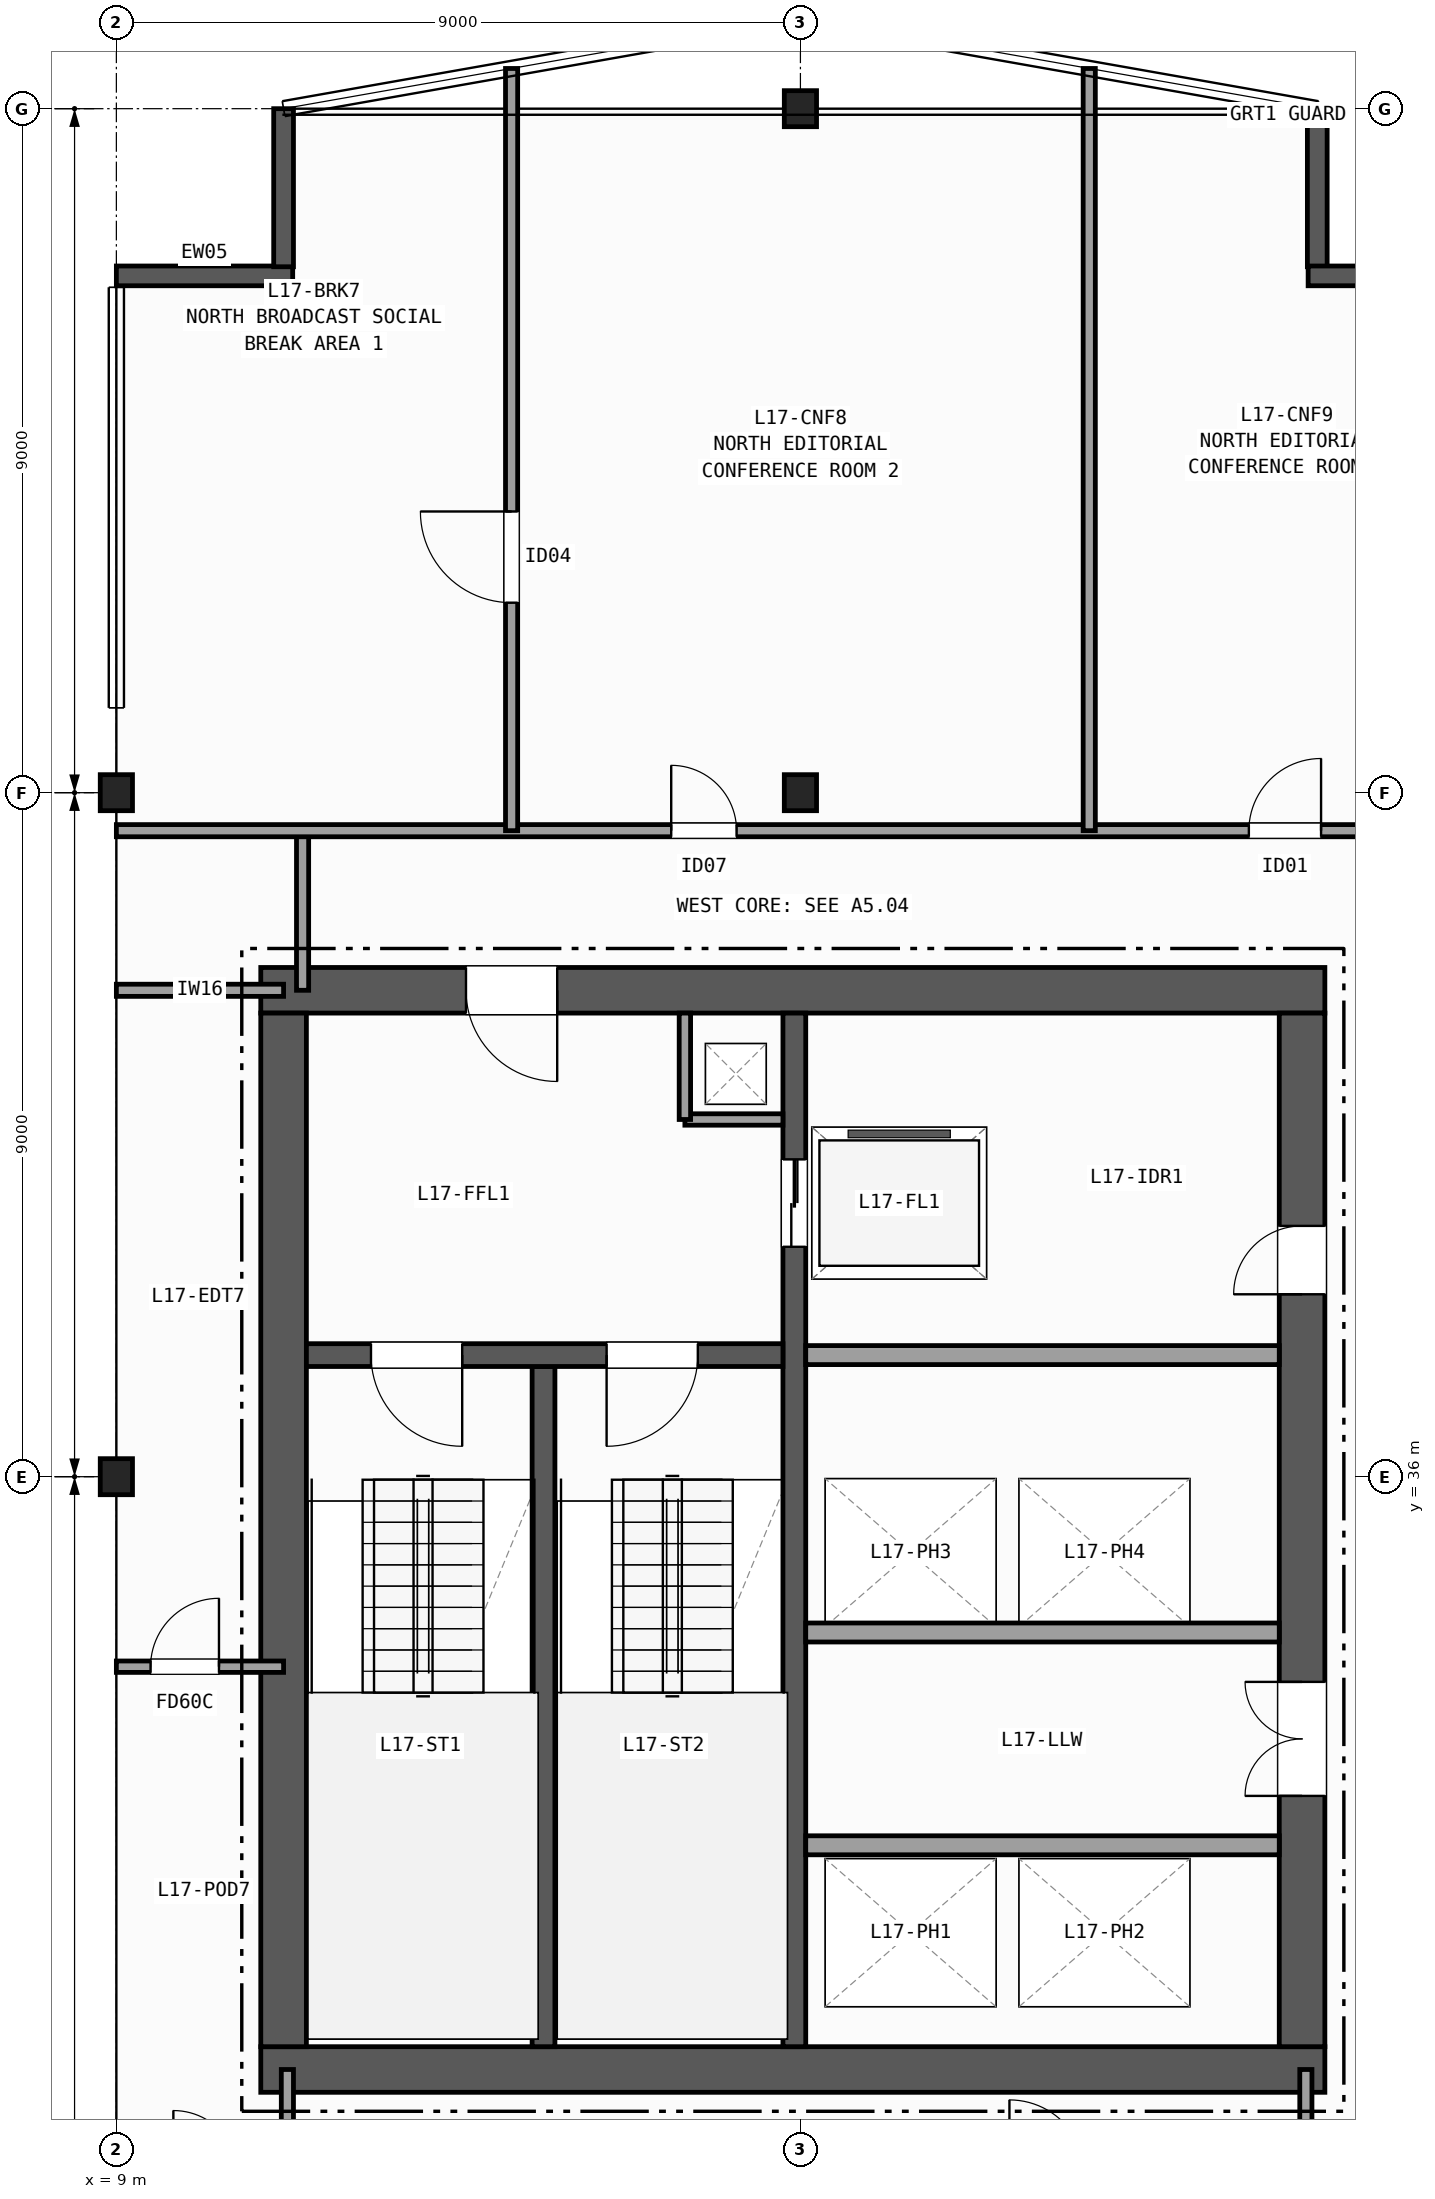
"""IFC4 building model, lengths in metres.
Left out: names, types, materials, properties, quantities, classifications, styles, units other than length and angle.
Written with IfcOpenShell. Run it as: python <this file> out.ifc"""

import sys

from ifc_helpers import new_model, si_unit, direction, frame, frame_2d, origin, origin_2d, place, context, subcontext, project, spatial, rectangle, i_section, extrude, element, fill, save


model = new_model("IFC4")
c1 = context("Model", 3, precision=1e-05, world=origin(), true_north=direction((0.0, 1.0)))
c2 = subcontext(c1, "Body", "Model", "MODEL_VIEW")
j1 = project(units=[si_unit("LENGTHUNIT", "METRE"), si_unit("PLANEANGLEUNIT", "RADIAN")], contexts=[c1])
p1 = place(None, origin())
s1 = spatial("IfcSite", under=j1, at=p1, CompositionType="ELEMENT")
p2 = place(p1, origin())
s2 = spatial("IfcBuilding", under=s1, at=p2, CompositionType="ELEMENT")
p3 = place(p2, frame((0.0, 0.0, 73.0)))
s3 = spatial("IfcBuildingStorey", under=s2, at=p3, CompositionType="ELEMENT", Elevation=73.0)
for number, where, z_axis, x_axis in (
    (1, (9.0, 36.0, 0.0), (0.0, 0.0, 1.0), (1.0, 0.0, 0.0)),
    (2, (9.0, 45.0, 0.0), (0.0, 0.0, 1.0), (1.0, 0.0, 0.0)),
    (3, (18.0, 45.0, 0.0), (0.0, 0.0, 1.0), (1.0, 0.0, 0.0)),
    (4, (18.0, 54.0, 0.0), (0.0, 0.0, 1.0), (1.0, 0.0, 0.0)),
):
    element("IfcColumn", number, at=place(p3, frame(where, z_axis=z_axis, x_axis=x_axis)), inside=s3, PredefinedType="COLUMN", context=c2, shape_type="SweptSolid", body=[
        extrude(i_section(OverallWidth=0.424, OverallDepth=0.474, WebThickness=0.048, FlangeThickness=0.077, FilletRadius=0.015, at=origin_2d()), origin(), (0.0, 0.0, 1.0), 3.7),
    ])
p4 = place(p3, frame((9.0, 51.8, 0.0), z_axis=(0.0, 0.0, 1.0), x_axis=(1.0, 0.0, 0.0)))
e5 = element("IfcWall", 5, at=p4, inside=s3, PredefinedType="SOLIDWALL", context=c2, shape_type="SweptSolid", body=[
    extrude(rectangle(XDim=2.32, YDim=0.26, at=frame_2d((1.16, 0.0))), origin(), (0.0, 0.0, 1.0), 3.42),
])
for number, where, z_axis, x_axis in (
    (6, (11.2, 51.92, 0.0), (0.0, 0.0, 1.0), (0.0, 1.0, 0.0)),
    (7, (24.8, 54.0, 0.0), (0.0, 0.0, 1.0), (0.0, -1.0, 0.0)),
):
    element("IfcWall", number, at=place(p3, frame(where, z_axis=z_axis, x_axis=x_axis)), inside=s3, PredefinedType="SOLIDWALL", context=c2, shape_type="SweptSolid", body=[
        extrude(rectangle(XDim=2.08, YDim=0.26, at=frame_2d((1.04, 0.0))), origin(), (0.0, 0.0, 1.0), 3.42),
    ])
p5 = place(p3, frame((24.68, 51.8, 0.0), z_axis=(0.0, 0.0, 1.0), x_axis=(1.0, 0.0, 0.0)))
e8 = element("IfcWall", 8, at=p5, inside=s3, PredefinedType="SOLIDWALL", context=c2, shape_type="SweptSolid", body=[
    extrude(rectangle(XDim=2.32, YDim=0.26, at=frame_2d((1.16, 0.0))), origin(), (0.0, 0.0, 1.0), 3.42),
])
p6 = place(p3, frame((10.9, 28.2, 0.0), z_axis=(0.0, 0.0, 1.0), x_axis=(1.0, 0.0, 0.0)))
e9 = element("IfcWall", 9, at=p6, inside=s3, PredefinedType="SHEAR", context=c2, shape_type="SweptSolid", body=[
    extrude(rectangle(XDim=14.0, YDim=0.6, at=frame_2d((7.0, 0.0))), origin(), (0.0, 0.0, 1.0), 3.42),
])
p7 = place(p3, frame((24.9, 42.4, 0.0), z_axis=(0.0, 0.0, 1.0), x_axis=(-1.0, 0.0, 0.0)))
e10 = element("IfcWall", 10, at=p7, inside=s3, PredefinedType="SHEAR", context=c2, shape_type="SweptSolid", body=[
    extrude(rectangle(XDim=14.0, YDim=0.6, at=frame_2d((7.0, 0.0))), origin(), (0.0, 0.0, 1.0), 3.42),
])
p8 = place(p7, frame((10.1, 0.0, 0.0)))
e11 = element("IfcOpeningElement", 11, at=p8, cuts=e10, PredefinedType="OPENING", context=c2, shape_type="SweptSolid", body=[
    extrude(rectangle(XDim=1.2, YDim=2.15, at=frame_2d((0.6, 1.075))), frame((0.0, 0.31, 0.0), z_axis=(0.0, -1.0, 0.0), x_axis=(1.0, 0.0, 0.0)), (0.0, 0.0, 1.0), 0.62),
])
p9 = place(p3, frame((11.2, 42.1, 0.0), z_axis=(0.0, 0.0, 1.0), x_axis=(0.0, -1.0, 0.0)))
e12 = element("IfcWall", 12, at=p9, inside=s3, PredefinedType="SHEAR", context=c2, shape_type="SweptSolid", body=[
    extrude(rectangle(XDim=13.6, YDim=0.6, at=frame_2d((6.8, 0.0))), origin(), (0.0, 0.0, 1.0), 3.42),
])
p10 = place(p3, frame((24.6, 28.5, 0.0), z_axis=(0.0, 0.0, 1.0), x_axis=(0.0, 1.0, 0.0)))
e13 = element("IfcWall", 13, at=p10, inside=s3, PredefinedType="SHEAR", context=c2, shape_type="SweptSolid", body=[
    extrude(rectangle(XDim=13.6, YDim=0.6, at=frame_2d((6.8, 0.0))), origin(), (0.0, 0.0, 1.0), 3.42),
])
p11 = place(p10, frame((3.3, 0.0, 0.0)))
e14 = element("IfcOpeningElement", 14, at=p11, cuts=e13, PredefinedType="OPENING", context=c2, shape_type="SweptSolid", body=[
    extrude(rectangle(XDim=1.5, YDim=2.2, at=frame_2d((0.75, 1.1))), frame((0.0, 0.31, 0.0), z_axis=(0.0, -1.0, 0.0), x_axis=(1.0, 0.0, 0.0)), (0.0, 0.0, 1.0), 0.62),
])
p12 = place(p10, frame((9.9, 0.0, 0.0)))
e15 = element("IfcOpeningElement", 15, at=p12, cuts=e13, PredefinedType="OPENING", context=c2, shape_type="SweptSolid", body=[
    extrude(rectangle(XDim=0.9, YDim=2.1, at=frame_2d((0.45, 1.05))), frame((0.0, 0.31, 0.0), z_axis=(0.0, -1.0, 0.0), x_axis=(1.0, 0.0, 0.0)), (0.0, 0.0, 1.0), 0.62),
])
p13 = place(p3, frame((14.62, 28.5, 0.0), z_axis=(0.0, 0.0, 1.0), x_axis=(0.0, 1.0, 0.0)))
e16 = element("IfcWall", 16, at=p13, inside=s3, PredefinedType="SHEAR", context=c2, shape_type="SweptSolid", body=[
    extrude(rectangle(XDim=8.95, YDim=0.3, at=frame_2d((4.475, 0.0))), origin(), (0.0, 0.0, 1.0), 3.42),
])
p14 = place(p3, frame((17.92, 42.1, 0.0), z_axis=(0.0, 0.0, 1.0), x_axis=(0.0, -1.0, 0.0)))
e17 = element("IfcWall", 17, at=p14, inside=s3, PredefinedType="SHEAR", context=c2, shape_type="SweptSolid", body=[
    extrude(rectangle(XDim=13.6, YDim=0.3, at=frame_2d((6.8, 0.0))), origin(), (0.0, 0.0, 1.0), 3.42),
])
p15 = place(p14, frame((1.925, 0.0, 0.0)))
e18 = element("IfcOpeningElement", 18, at=p15, cuts=e17, PredefinedType="OPENING", context=c2, shape_type="SweptSolid", body=[
    extrude(rectangle(XDim=1.15, YDim=2.15, at=frame_2d((0.575, 1.075))), frame((0.0, 0.16, 0.0), z_axis=(0.0, -1.0, 0.0), x_axis=(1.0, 0.0, 0.0)), (0.0, 0.0, 1.0), 0.32),
])
p16 = place(p3, frame((17.77, 37.6, 0.0), z_axis=(0.0, 0.0, 1.0), x_axis=(-1.0, 0.0, 0.0)))
e19 = element("IfcWall", 19, at=p16, inside=s3, PredefinedType="SHEAR", context=c2, shape_type="SweptSolid", body=[
    extrude(rectangle(XDim=6.27, YDim=0.3, at=frame_2d((3.135, 0.0))), origin(), (0.0, 0.0, 1.0), 3.42),
])
p17 = place(p16, frame((4.22, 0.0, 0.0)))
e20 = element("IfcOpeningElement", 20, at=p17, cuts=e19, PredefinedType="OPENING", context=c2, shape_type="SweptSolid", body=[
    extrude(rectangle(XDim=1.2, YDim=2.15, at=frame_2d((0.6, 1.075))), frame((0.0, 0.16, 0.0), z_axis=(0.0, -1.0, 0.0), x_axis=(1.0, 0.0, 0.0)), (0.0, 0.0, 1.0), 0.32),
])
p18 = place(p16, frame((1.12, 0.0, 0.0)))
e21 = element("IfcOpeningElement", 21, at=p18, cuts=e19, PredefinedType="OPENING", context=c2, shape_type="SweptSolid", body=[
    extrude(rectangle(XDim=1.2, YDim=2.15, at=frame_2d((0.6, 1.075))), frame((0.0, 0.16, 0.0), z_axis=(0.0, -1.0, 0.0), x_axis=(1.0, 0.0, 0.0)), (0.0, 0.0, 1.0), 0.32),
])
p19 = place(p3, frame((16.48, 40.7, 0.0), z_axis=(0.0, 0.0, 1.0), x_axis=(1.0, 0.0, 0.0)))
e22 = element("IfcWall", 22, at=p19, inside=s3, PredefinedType="PARTITIONING", context=c2, shape_type="SweptSolid", body=[
    extrude(rectangle(XDim=1.29, YDim=0.15, at=frame_2d((0.645, 0.0))), origin(), (0.0, 0.0, 1.0), 3.42),
])
p20 = place(p3, frame((16.48, 40.7, 0.0), z_axis=(0.0, 0.0, 1.0), x_axis=(0.0, 1.0, 0.0)))
e23 = element("IfcWall", 23, at=p20, inside=s3, PredefinedType="PARTITIONING", context=c2, shape_type="SweptSolid", body=[
    extrude(rectangle(XDim=1.4, YDim=0.15, at=frame_2d((0.7, 0.0))), origin(), (0.0, 0.0, 1.0), 3.42),
])
for number, where, z_axis, x_axis in (
    (24, (18.07, 37.6, 0.0), (0.0, 0.0, 1.0), (1.0, 0.0, 0.0)),
    (25, (18.07, 31.15, 0.0), (0.0, 0.0, 1.0), (1.0, 0.0, 0.0)),
    (26, (24.3, 33.95, 0.0), (0.0, 0.0, 1.0), (-1.0, 0.0, 0.0)),
):
    element("IfcWall", number, at=place(p3, frame(where, z_axis=z_axis, x_axis=x_axis)), inside=s3, PredefinedType="PARTITIONING", context=c2, shape_type="SweptSolid", body=[
        extrude(rectangle(XDim=6.23, YDim=0.25, at=frame_2d((3.115, 0.0))), origin(), (0.0, 0.0, 1.0), 3.42),
    ])
p21 = place(p3, frame((9.0, 42.4, 0.0), z_axis=(0.0, 0.0, 1.0), x_axis=(1.0, 0.0, 0.0)))
e27 = element("IfcWall", 27, at=p21, inside=s3, PredefinedType="PARTITIONING", context=c2, shape_type="SweptSolid", body=[
    extrude(rectangle(XDim=2.2, YDim=0.16, at=frame_2d((1.1, 0.0))), origin(), (0.0, 0.0, 1.0), 2.627),
])
p22 = place(p3, frame((11.45, 42.4, 0.0), z_axis=(0.0, 0.0, 1.0), x_axis=(0.0, 1.0, 0.0)))
e28 = element("IfcWall", 28, at=p22, inside=s3, PredefinedType="PARTITIONING", context=c2, shape_type="SweptSolid", body=[
    extrude(rectangle(XDim=2.1, YDim=0.16, at=frame_2d((1.05, 0.0))), origin(), (0.0, 0.0, 1.0), 3.42),
])
p23 = place(p3, frame((9.0, 33.5, 0.0), z_axis=(0.0, 0.0, 1.0), x_axis=(1.0, 0.0, 0.0)))
e29 = element("IfcWall", 29, at=p23, inside=s3, PredefinedType="PARTITIONING", context=c2, shape_type="SweptSolid", body=[
    extrude(rectangle(XDim=2.2, YDim=0.15, at=frame_2d((1.1, 0.0))), origin(), (0.0, 0.0, 1.0), 2.627),
])
p24 = place(p23, frame((0.45, 0.0, 0.0)))
e30 = element("IfcOpeningElement", 30, at=p24, cuts=e29, PredefinedType="OPENING", context=c2, shape_type="SweptSolid", body=[
    extrude(rectangle(XDim=0.9, YDim=2.1, at=frame_2d((0.45, 1.05))), frame((0.0, 0.085, 0.0), z_axis=(0.0, -1.0, 0.0), x_axis=(1.0, 0.0, 0.0)), (0.0, 0.0, 1.0), 0.17),
])
p25 = place(p3, frame((24.65, 9.0, 0.0), z_axis=(0.0, 0.0, 1.0), x_axis=(0.0, 1.0, 0.0)))
e31 = element("IfcWall", 31, at=p25, inside=s3, PredefinedType="PARTITIONING", context=c2, shape_type="SweptSolid", body=[
    extrude(rectangle(XDim=19.2, YDim=0.16, at=frame_2d((9.6, 0.0))), origin(), (0.0, 0.0, 1.0), 2.627),
])
p26 = place(p25, frame((12.2, 0.0, 0.0)))
e32 = element("IfcOpeningElement", 32, at=p26, cuts=e31, PredefinedType="OPENING", context=c2, shape_type="SweptSolid", body=[
    extrude(rectangle(XDim=1.05, YDim=2.15, at=frame_2d((0.525, 1.075))), frame((0.0, 0.09, 0.0), z_axis=(0.0, -1.0, 0.0), x_axis=(1.0, 0.0, 0.0)), (0.0, 0.0, 1.0), 0.18),
])
p27 = place(p25, frame((4.2, 0.0, 0.0)))
e33 = element("IfcOpeningElement", 33, at=p27, cuts=e31, PredefinedType="OPENING", context=c2, shape_type="SweptSolid", body=[
    extrude(rectangle(XDim=1.2, YDim=2.15, at=frame_2d((0.6, 1.075))), frame((0.0, 0.09, 0.0), z_axis=(0.0, -1.0, 0.0), x_axis=(1.0, 0.0, 0.0)), (0.0, 0.0, 1.0), 0.18),
])
p28 = place(p3, frame((11.25, 26.8, 0.0), z_axis=(0.0, 0.0, 1.0), x_axis=(0.0, 1.0, 0.0)))
e34 = element("IfcWall", 34, at=p28, inside=s3, PredefinedType="PARTITIONING", context=c2, shape_type="SweptSolid", body=[
    extrude(rectangle(XDim=1.4, YDim=0.16, at=frame_2d((0.7, 0.0))), origin(), (0.0, 0.0, 1.0), 2.789),
])
p29 = place(p3, frame((9.0, 44.5, 0.0), z_axis=(0.0, 0.0, 1.0), x_axis=(1.0, 0.0, 0.0)))
e35 = element("IfcWall", 35, at=p29, inside=s3, PredefinedType="PARTITIONING", context=c2, shape_type="SweptSolid", body=[
    extrude(rectangle(XDim=18.0, YDim=0.16, at=frame_2d((9.0, 0.0))), origin(), (0.0, 0.0, 1.0), 2.627),
])
p30 = place(p29, frame((7.3, 0.0, 0.0)))
e36 = element("IfcOpeningElement", 36, at=p30, cuts=e35, PredefinedType="OPENING", context=c2, shape_type="SweptSolid", body=[
    extrude(rectangle(XDim=0.86, YDim=2.05, at=frame_2d((0.43, 1.025))), frame((0.0, 0.09, 0.0), z_axis=(0.0, -1.0, 0.0), x_axis=(1.0, 0.0, 0.0)), (0.0, 0.0, 1.0), 0.18),
])
p31 = place(p29, frame((14.9, 0.0, 0.0)))
e37 = element("IfcOpeningElement", 37, at=p31, cuts=e35, PredefinedType="OPENING", context=c2, shape_type="SweptSolid", body=[
    extrude(rectangle(XDim=0.95, YDim=2.1, at=frame_2d((0.475, 1.05))), frame((0.0, 0.09, 0.0), z_axis=(0.0, -1.0, 0.0), x_axis=(1.0, 0.0, 0.0)), (0.0, 0.0, 1.0), 0.18),
])
p32 = place(p3, frame((14.2, 44.5, 0.0), z_axis=(0.0, 0.0, 1.0), x_axis=(0.0, 1.0, 0.0)))
e38 = element("IfcWall", 38, at=p32, inside=s3, PredefinedType="PARTITIONING", context=c2, shape_type="SweptSolid", body=[
    extrude(rectangle(XDim=10.029, YDim=0.16, at=frame_2d((5.015, 0.0))), origin(), (0.0, 0.0, 1.0), 3.42),
])
p33 = place(p32, frame((3.0, 0.0, 0.0)))
e39 = element("IfcOpeningElement", 39, at=p33, cuts=e38, PredefinedType="OPENING", context=c2, shape_type="SweptSolid", body=[
    extrude(rectangle(XDim=1.2, YDim=2.15, at=frame_2d((0.6, 1.075))), frame((0.0, 0.09, 0.0), z_axis=(0.0, -1.0, 0.0), x_axis=(1.0, 0.0, 0.0)), (0.0, 0.0, 1.0), 0.18),
])
p34 = place(p3, frame((21.8, 44.5, 0.0), z_axis=(0.0, 0.0, 1.0), x_axis=(0.0, 1.0, 0.0)))
e40 = element("IfcWall", 40, at=p34, inside=s3, PredefinedType="PARTITIONING", context=c2, shape_type="SweptSolid", body=[
    extrude(rectangle(XDim=10.029, YDim=0.16, at=frame_2d((5.015, 0.0))), origin(), (0.0, 0.0, 1.0), 3.42),
])
p35 = place(p17, origin())
e41 = element("IfcDoor", 41, at=p35, inside=s3, OperationType="SINGLE_SWING_LEFT", PredefinedType="DOOR", context=c2, shape_type="SweptSolid", body=[
    extrude(rectangle(XDim=1.2, YDim=2.15, at=frame_2d((0.6, 1.075))), frame((0.0, 0.025, 0.0), z_axis=(0.0, -1.0, 0.0), x_axis=(1.0, 0.0, 0.0)), (0.0, 0.0, 1.0), 0.05),
])
fill(e20, e41)
p36 = place(p18, origin())
e42 = element("IfcDoor", 42, at=p36, inside=s3, OperationType="SINGLE_SWING_RIGHT", PredefinedType="DOOR", context=c2, shape_type="SweptSolid", body=[
    extrude(rectangle(XDim=1.2, YDim=2.15, at=frame_2d((0.6, 1.075))), frame((0.0, 0.025, 0.0), z_axis=(0.0, -1.0, 0.0), x_axis=(1.0, 0.0, 0.0)), (0.0, 0.0, 1.0), 0.05),
])
fill(e21, e42)
p37 = place(p11, origin())
e43 = element("IfcDoor", 43, at=p37, inside=s3, OperationType="DOUBLE_DOOR_SINGLE_SWING", PredefinedType="DOOR", context=c2, shape_type="SweptSolid", body=[
    extrude(rectangle(XDim=1.5, YDim=2.2, at=frame_2d((0.75, 1.1))), frame((0.0, 0.025, 0.0), z_axis=(0.0, -1.0, 0.0), x_axis=(1.0, 0.0, 0.0)), (0.0, 0.0, 1.0), 0.05),
])
fill(e14, e43)
p38 = place(p8, origin())
e44 = element("IfcDoor", 44, at=p38, inside=s3, OperationType="SINGLE_SWING_LEFT", PredefinedType="DOOR", context=c2, shape_type="SweptSolid", body=[
    extrude(rectangle(XDim=1.2, YDim=2.15, at=frame_2d((0.6, 1.075))), frame((0.0, 0.025, 0.0), z_axis=(0.0, -1.0, 0.0), x_axis=(1.0, 0.0, 0.0)), (0.0, 0.0, 1.0), 0.05),
])
fill(e11, e44)
p39 = place(p12, origin())
e45 = element("IfcDoor", 45, at=p39, inside=s3, OperationType="SINGLE_SWING_LEFT", PredefinedType="DOOR", context=c2, shape_type="SweptSolid", body=[
    extrude(rectangle(XDim=0.9, YDim=2.1, at=frame_2d((0.45, 1.05))), frame((0.0, 0.025, 0.0), z_axis=(0.0, -1.0, 0.0), x_axis=(1.0, 0.0, 0.0)), (0.0, 0.0, 1.0), 0.05),
])
fill(e15, e45)
p40 = place(p15, origin())
e46 = element("IfcDoor", 46, at=p40, inside=s3, OperationType="DOUBLE_DOOR_SLIDING", PredefinedType="DOOR", context=c2, shape_type="SweptSolid", body=[
    extrude(rectangle(XDim=1.15, YDim=2.15, at=frame_2d((0.575, 1.075))), frame((0.0, 0.025, 0.0), z_axis=(0.0, -1.0, 0.0), x_axis=(1.0, 0.0, 0.0)), (0.0, 0.0, 1.0), 0.05),
])
fill(e18, e46)
p41 = place(p24, origin())
e47 = element("IfcDoor", 47, at=p41, inside=s3, OperationType="SINGLE_SWING_RIGHT", PredefinedType="DOOR", context=c2, shape_type="SweptSolid", body=[
    extrude(rectangle(XDim=0.9, YDim=2.1, at=frame_2d((0.45, 1.05))), frame((0.0, 0.025, 0.0), z_axis=(0.0, -1.0, 0.0), x_axis=(1.0, 0.0, 0.0)), (0.0, 0.0, 1.0), 0.05),
])
fill(e30, e47)
p42 = place(p33, origin())
e48 = element("IfcDoor", 48, at=p42, inside=s3, OperationType="SINGLE_SWING_RIGHT", PredefinedType="DOOR", context=c2, shape_type="SweptSolid", body=[
    extrude(rectangle(XDim=1.2, YDim=2.15, at=frame_2d((0.6, 1.075))), frame((0.0, 0.025, 0.0), z_axis=(0.0, -1.0, 0.0), x_axis=(1.0, 0.0, 0.0)), (0.0, 0.0, 1.0), 0.05),
])
fill(e39, e48)
p43 = place(p30, origin())
e49 = element("IfcDoor", 49, at=p43, inside=s3, OperationType="SINGLE_SWING_LEFT", PredefinedType="DOOR", context=c2, shape_type="SweptSolid", body=[
    extrude(rectangle(XDim=0.86, YDim=2.05, at=frame_2d((0.43, 1.025))), frame((0.0, 0.025, 0.0), z_axis=(0.0, -1.0, 0.0), x_axis=(1.0, 0.0, 0.0)), (0.0, 0.0, 1.0), 0.05),
])
fill(e36, e49)
p44 = place(p31, origin())
e50 = element("IfcDoor", 50, at=p44, inside=s3, OperationType="SINGLE_SWING_RIGHT", PredefinedType="DOOR", context=c2, shape_type="SweptSolid", body=[
    extrude(rectangle(XDim=0.95, YDim=2.1, at=frame_2d((0.475, 1.05))), frame((0.0, 0.025, 0.0), z_axis=(0.0, -1.0, 0.0), x_axis=(1.0, 0.0, 0.0)), (0.0, 0.0, 1.0), 0.05),
])
fill(e37, e50)
save(model, sys.argv[1])
